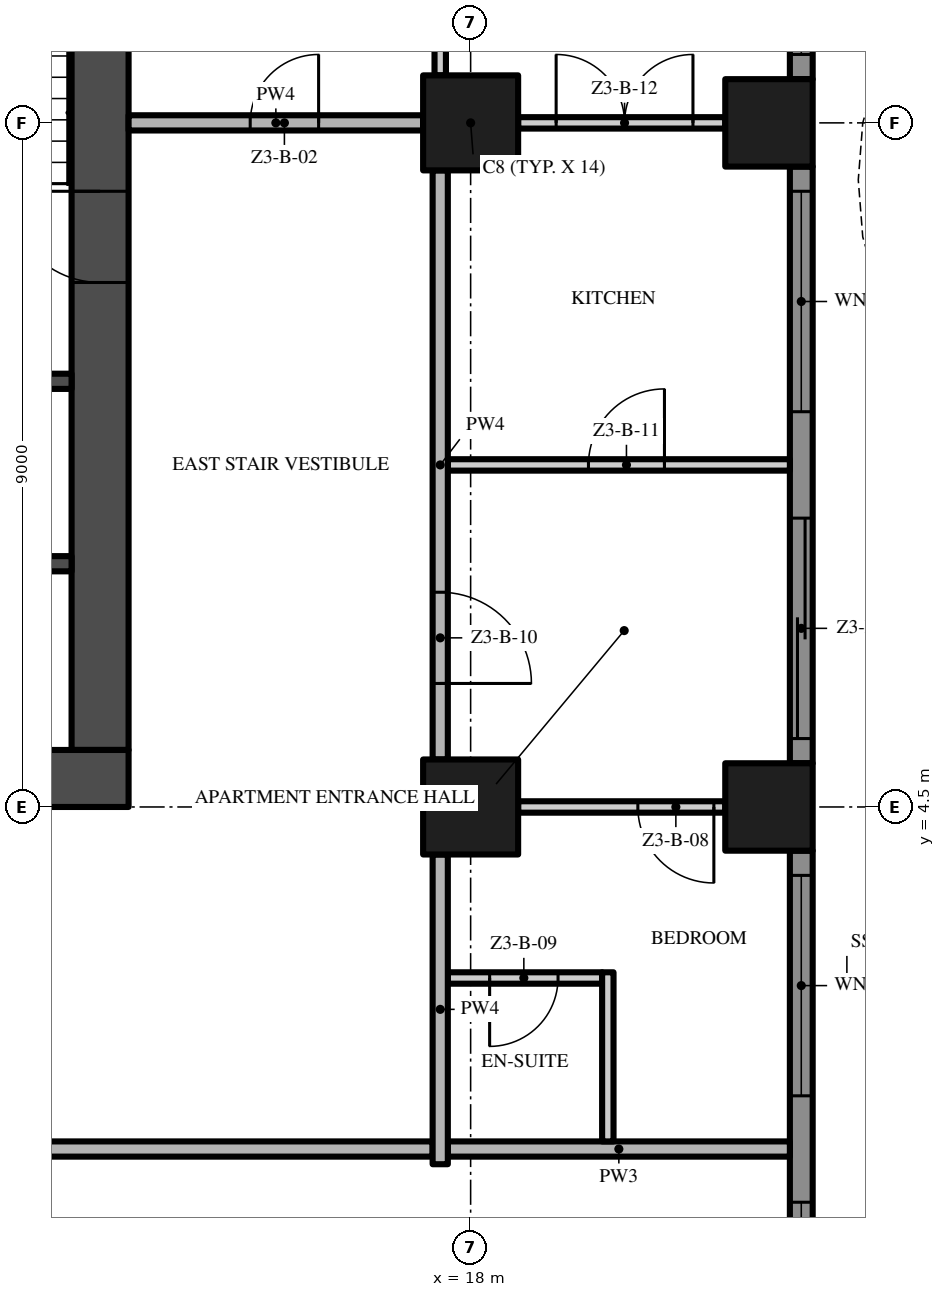
"""IFC4 building model, lengths in metres.
Left out: names, types, materials, properties, quantities, classifications, styles, units other than length and angle.
Written with IfcOpenShell. Run it as: python <this file> out.ifc"""

import sys

from ifc_helpers import new_model, si_unit, direction, frame, frame_2d, origin, origin_2d, place, context, subcontext, project, spatial, polyline, rectangle, outline, extrude, element, fill, save


model = new_model("IFC4")
c1 = context("Model", 3, precision=1e-05, world=origin(), true_north=direction((0.0, 1.0)))
c2 = subcontext(c1, "Body", "Model", "MODEL_VIEW")
j1 = project(units=[si_unit("LENGTHUNIT", "METRE"), si_unit("PLANEANGLEUNIT", "RADIAN")], contexts=[c1])
p1 = place(None, origin())
s1 = spatial("IfcSite", under=j1, at=p1, CompositionType="ELEMENT")
p2 = place(p1, origin())
s2 = spatial("IfcBuilding", under=s1, at=p2, CompositionType="ELEMENT")
p3 = place(p2, frame((0.0, 0.0, 144.0)))
s3 = spatial("IfcBuildingStorey", under=s2, at=p3, CompositionType="ELEMENT", Elevation=144.0)
p4 = place(p3, frame((-13.5, 4.875, -0.3), z_axis=(0.0, 0.0, 1.0), x_axis=(1.0, 0.0, 0.0)))
e1 = element("IfcWall", 1, at=p4, inside=s3, PredefinedType="SHEAR", context=c2, shape_type="SweptSolid", body=[
    extrude(rectangle(XDim=27.0, YDim=0.75, at=frame_2d((13.5, 0.0))), origin(), (0.0, 0.0, 1.0), 3.8),
])
p5 = place(p4, frame((12.0, 0.0, 0.3)))
e2 = element("IfcOpeningElement", 2, at=p5, cuts=e1, PredefinedType="OPENING", context=c2, shape_type="SweptSolid", body=[
    extrude(rectangle(XDim=3.0, YDim=2.4, at=frame_2d((1.5, 1.2))), frame((0.0, 0.385, 0.0), z_axis=(0.0, -1.0, 0.0), x_axis=(1.0, 0.0, 0.0)), (0.0, 0.0, 1.0), 0.77),
])
p6 = place(p4, frame((4.9, 0.0, 0.3)))
e3 = element("IfcOpeningElement", 3, at=p6, cuts=e1, PredefinedType="OPENING", context=c2, shape_type="SweptSolid", body=[
    extrude(rectangle(XDim=1.2, YDim=2.2, at=frame_2d((0.6, 1.1))), frame((0.0, 0.385, 0.0), z_axis=(0.0, -1.0, 0.0), x_axis=(1.0, 0.0, 0.0)), (0.0, 0.0, 1.0), 0.77),
])
p7 = place(p4, frame((20.75, 0.0, 0.3)))
e4 = element("IfcOpeningElement", 4, at=p7, cuts=e1, PredefinedType="OPENING", context=c2, shape_type="SweptSolid", body=[
    extrude(rectangle(XDim=1.5, YDim=2.2, at=frame_2d((0.75, 1.1))), frame((0.0, 0.385, 0.0), z_axis=(0.0, -1.0, 0.0), x_axis=(1.0, 0.0, 0.0)), (0.0, 0.0, 1.0), 0.77),
])
p8 = place(p4, frame((17.4, 0.0, 0.3)))
e5 = element("IfcOpeningElement", 5, at=p8, cuts=e1, PredefinedType="OPENING", context=c2, shape_type="SweptSolid", body=[
    extrude(rectangle(XDim=1.2, YDim=2.2, at=frame_2d((0.6, 1.1))), frame((0.0, 0.385, 0.0), z_axis=(0.0, -1.0, 0.0), x_axis=(1.0, 0.0, 0.0)), (0.0, 0.0, 1.0), 0.77),
])
p9 = place(p3, frame((13.125, 5.25, -0.3), z_axis=(0.0, 0.0, 1.0), x_axis=(0.0, 1.0, 0.0)))
e6 = element("IfcWall", 6, at=p9, inside=s3, PredefinedType="SHEAR", context=c2, shape_type="SweptSolid", body=[
    extrude(rectangle(XDim=16.5, YDim=0.75, at=frame_2d((8.25, 0.0))), origin(), (0.0, 0.0, 1.0), 3.8),
])
p10 = place(p9, frame((6.15, 0.0, 0.3)))
e7 = element("IfcOpeningElement", 7, at=p10, cuts=e6, PredefinedType="OPENING", context=c2, shape_type="SweptSolid", body=[
    extrude(rectangle(XDim=1.2, YDim=2.2, at=frame_2d((0.6, 1.1))), frame((0.0, 0.385, 0.0), z_axis=(0.0, -1.0, 0.0), x_axis=(1.0, 0.0, 0.0)), (0.0, 0.0, 1.0), 0.77),
])
for number, where, z_axis, x_axis in (
    (8, (18.0, 13.5, 0.0), (0.0, 0.0, 1.0), (1.0, 0.0, 0.0)),
    (9, (18.0, 4.5, 0.0), (0.0, 0.0, 1.0), (1.0, 0.0, 0.0)),
):
    element("IfcColumn", number, at=place(p3, frame(where, z_axis=z_axis, x_axis=x_axis)), inside=s3, PredefinedType="COLUMN", context=c2, shape_type="SweptSolid", body=[
        extrude(rectangle(XDim=1.25, YDim=1.25, at=origin_2d()), origin(), (0.0, 0.0, 1.0), 3.5),
    ])
for number, where, z_axis, x_axis in (
    (10, (21.925, 13.5, 0.0), (0.0, 0.0, 1.0), (1.0, 0.0, 0.0)),
    (11, (21.925, 4.5, 0.0), (0.0, 0.0, 1.0), (1.0, 0.0, 0.0)),
):
    element("IfcColumn", number, at=place(p3, frame(where, z_axis=z_axis, x_axis=x_axis)), inside=s3, PredefinedType="COLUMN", context=c2, shape_type="SweptSolid", body=[
        extrude(rectangle(XDim=1.15, YDim=1.15, at=origin_2d()), origin(), (0.0, 0.0, 1.0), 3.5),
    ])
p11 = place(p3, frame((22.35, 3.925, 0.0), z_axis=(0.0, 0.0, 1.0), x_axis=(0.0, -1.0, 0.0)))
e12 = element("IfcWall", 12, at=p11, inside=s3, PredefinedType="SOLIDWALL", context=c2, shape_type="SweptSolid", body=[
    extrude(rectangle(XDim=7.85, YDim=0.3, at=frame_2d((3.925, 0.0))), origin(), (0.0, 0.0, 1.0), 3.5),
])
p12 = place(p11, frame((4.625, 0.0, 0.45)))
e13 = element("IfcOpeningElement", 13, at=p12, cuts=e12, PredefinedType="OPENING", context=c2, shape_type="SweptSolid", body=[
    extrude(rectangle(XDim=2.9, YDim=2.65, at=frame_2d((1.45, 1.325))), frame((0.0, 0.16, 0.0), z_axis=(0.0, -1.0, 0.0), x_axis=(1.0, 0.0, 0.0)), (0.0, 0.0, 1.0), 0.32),
])
p13 = place(p11, frame((0.325, 0.0, 0.45)))
e14 = element("IfcOpeningElement", 14, at=p13, cuts=e12, PredefinedType="OPENING", context=c2, shape_type="SweptSolid", body=[
    extrude(rectangle(XDim=2.9, YDim=2.65, at=frame_2d((1.45, 1.325))), frame((0.0, 0.16, 0.0), z_axis=(0.0, -1.0, 0.0), x_axis=(1.0, 0.0, 0.0)), (0.0, 0.0, 1.0), 0.32),
])
p14 = place(p3, frame((22.35, 12.925, 0.0), z_axis=(0.0, 0.0, 1.0), x_axis=(0.0, -1.0, 0.0)))
e15 = element("IfcWall", 15, at=p14, inside=s3, PredefinedType="SOLIDWALL", context=c2, shape_type="SweptSolid", body=[
    extrude(rectangle(XDim=7.85, YDim=0.3, at=frame_2d((3.925, 0.0))), origin(), (0.0, 0.0, 1.0), 3.5),
])
p15 = place(p14, frame((4.625, 0.0, 0.0)))
e16 = element("IfcOpeningElement", 16, at=p15, cuts=e15, PredefinedType="OPENING", context=c2, shape_type="SweptSolid", body=[
    extrude(rectangle(XDim=2.9, YDim=2.4, at=frame_2d((1.45, 1.2))), frame((0.0, 0.16, 0.0), z_axis=(0.0, -1.0, 0.0), x_axis=(1.0, 0.0, 0.0)), (0.0, 0.0, 1.0), 0.32),
])
p16 = place(p14, frame((0.325, 0.0, 0.45)))
e17 = element("IfcOpeningElement", 17, at=p16, cuts=e15, PredefinedType="OPENING", context=c2, shape_type="SweptSolid", body=[
    extrude(rectangle(XDim=2.9, YDim=2.65, at=frame_2d((1.45, 1.325))), frame((0.0, 0.16, 0.0), z_axis=(0.0, -1.0, 0.0), x_axis=(1.0, 0.0, 0.0)), (0.0, 0.0, 1.0), 0.32),
])
p17 = place(p3, frame((22.35, 18.0, 0.0), z_axis=(0.0, 0.0, 1.0), x_axis=(0.0, -1.0, 0.0)))
e18 = element("IfcWall", 18, at=p17, inside=s3, PredefinedType="SOLIDWALL", context=c2, shape_type="SweptSolid", body=[
    extrude(rectangle(XDim=3.925, YDim=0.3, at=frame_2d((1.962, 0.0))), origin(), (0.0, 0.0, 1.0), 3.5),
])
p18 = place(p17, frame((0.7, 0.0, 0.45)))
e19 = element("IfcOpeningElement", 19, at=p18, cuts=e18, PredefinedType="OPENING", context=c2, shape_type="SweptSolid", body=[
    extrude(rectangle(XDim=2.9, YDim=2.65, at=frame_2d((1.45, 1.325))), frame((0.0, 0.16, 0.0), z_axis=(0.0, -1.0, 0.0), x_axis=(1.0, 0.0, 0.0)), (0.0, 0.0, 1.0), 0.32),
])
p19 = place(p3, origin())
e20 = element("IfcWall", 20, at=p19, inside=s3, PredefinedType="USERDEFINED", context=c2, shape_type="SweptSolid", body=[
    extrude(outline(polyline([(24.3, -13.5), (25.005, -12.0), (25.441, -10.5), (25.5, -9.75), (25.441, -9.0), (25.005, -7.5), (24.3, -6.0), (23.595, -4.5), (23.159, -3.0), (23.1, -2.25), (23.159, -1.5), (23.595, 0.0), (24.3, 1.5), (25.005, 3.0), (25.441, 4.5), (25.5, 5.25), (25.441, 6.0), (25.005, 7.5), (24.3, 9.0), (23.595, 10.5), (23.159, 12.0), (23.1, 12.75), (23.159, 13.5), (23.595, 15.0), (24.3, 16.5), (25.005, 18.0), (24.779, 18.106), (24.074, 16.606), (23.36, 15.089), (22.911, 13.545), (22.849, 12.75), (22.911, 11.955), (23.36, 10.411), (24.074, 8.894), (24.771, 7.411), (25.194, 5.955), (25.249, 5.25), (25.194, 4.545), (24.771, 3.089), (24.074, 1.606), (23.36, 0.089), (22.911, -1.455), (22.849, -2.25), (22.911, -3.045), (23.36, -4.589), (24.074, -6.106), (24.771, -7.589), (25.194, -9.045), (25.249, -9.75), (25.194, -10.455), (24.771, -11.911), (24.074, -13.394), (24.3, -13.5)])), origin(), (0.0, 0.0, 1.0), 0.9),
])
for number, where, z_axis, x_axis in (
    (21, (9.65, 7.7, 0.0), (0.0, 0.0, 1.0), (1.0, 0.0, 0.0)),
    (22, (9.65, 10.1, 0.0), (0.0, 0.0, 1.0), (1.0, 0.0, 0.0)),
):
    element("IfcWall", number, at=place(p3, frame(where, z_axis=z_axis, x_axis=x_axis)), inside=s3, PredefinedType="SHEAR", context=c2, shape_type="SweptSolid", body=[
        extrude(rectangle(XDim=3.1, YDim=0.2, at=frame_2d((1.55, 0.0))), origin(), (0.0, 0.0, 1.0), 3.5),
    ])
p20 = place(p3, frame((17.5, 0.0, 0.0), z_axis=(0.0, 0.0, 1.0), x_axis=(-1.0, 0.0, 0.0)))
e23 = element("IfcWall", 23, at=p20, inside=s3, PredefinedType="PARTITIONING", context=c2, shape_type="SweptSolid", body=[
    extrude(rectangle(XDim=35.0, YDim=0.2, at=frame_2d((17.5, 0.0))), origin(), (0.0, 0.0, 1.0), 3.5),
])
p21 = place(p20, frame((28.0, 0.0, 0.0)))
e24 = element("IfcOpeningElement", 24, at=p21, cuts=e23, PredefinedType="OPENING", context=c2, shape_type="SweptSolid", body=[
    extrude(rectangle(XDim=1.5, YDim=2.4, at=frame_2d((0.75, 1.2))), frame((0.0, 0.11, 0.0), z_axis=(0.0, -1.0, 0.0), x_axis=(1.0, 0.0, 0.0)), (0.0, 0.0, 1.0), 0.22),
])
p22 = place(p20, frame((10.0, 0.0, 0.0)))
e25 = element("IfcOpeningElement", 25, at=p22, cuts=e23, PredefinedType="OPENING", context=c2, shape_type="SweptSolid", body=[
    extrude(rectangle(XDim=1.5, YDim=2.4, at=frame_2d((0.75, 1.2))), frame((0.0, 0.11, 0.0), z_axis=(0.0, -1.0, 0.0), x_axis=(1.0, 0.0, 0.0)), (0.0, 0.0, 1.0), 0.22),
])
p23 = place(p3, frame((17.7, 0.0, 0.0), z_axis=(0.0, 0.0, 1.0), x_axis=(1.0, 0.0, 0.0)))
e26 = element("IfcWall", 26, at=p23, inside=s3, PredefinedType="PARTITIONING", context=c2, shape_type="SweptSolid", body=[
    extrude(rectangle(XDim=4.5, YDim=0.2, at=frame_2d((2.25, 0.0))), origin(), (0.0, 0.0, 1.0), 3.5),
])
p24 = place(p3, frame((19.73, 2.25, 0.0), z_axis=(0.0, 0.0, 1.0), x_axis=(-1.0, 0.0, 0.0)))
e27 = element("IfcWall", 27, at=p24, inside=s3, PredefinedType="PARTITIONING", context=c2, shape_type="SweptSolid", body=[
    extrude(rectangle(XDim=2.03, YDim=0.15, at=frame_2d((1.015, 0.0))), origin(), (0.0, 0.0, 1.0), 3.5),
])
p25 = place(p24, frame((0.58, 0.0, 0.0)))
e28 = element("IfcOpeningElement", 28, at=p25, cuts=e27, PredefinedType="OPENING", context=c2, shape_type="SweptSolid", body=[
    extrude(rectangle(XDim=0.9, YDim=2.1, at=frame_2d((0.45, 1.05))), frame((0.0, 0.085, 0.0), z_axis=(0.0, -1.0, 0.0), x_axis=(1.0, 0.0, 0.0)), (0.0, 0.0, 1.0), 0.17),
])
p26 = place(p3, frame((21.35, 4.5, 0.0), z_axis=(0.0, 0.0, 1.0), x_axis=(-1.0, 0.0, 0.0)))
e29 = element("IfcWall", 29, at=p26, inside=s3, PredefinedType="PARTITIONING", context=c2, shape_type="SweptSolid", body=[
    extrude(rectangle(XDim=2.725, YDim=0.15, at=frame_2d((1.363, 0.0))), origin(), (0.0, 0.0, 1.0), 3.5),
])
p27 = place(p26, frame((0.15, 0.0, 0.0)))
e30 = element("IfcOpeningElement", 30, at=p27, cuts=e29, PredefinedType="OPENING", context=c2, shape_type="SweptSolid", body=[
    extrude(rectangle(XDim=1.0, YDim=2.4, at=frame_2d((0.5, 1.2))), frame((0.0, 0.085, 0.0), z_axis=(0.0, -1.0, 0.0), x_axis=(1.0, 0.0, 0.0)), (0.0, 0.0, 1.0), 0.17),
])
p28 = place(p3, frame((17.7, 9.0, 0.0), z_axis=(0.0, 0.0, 1.0), x_axis=(1.0, 0.0, 0.0)))
e31 = element("IfcWall", 31, at=p28, inside=s3, PredefinedType="PARTITIONING", context=c2, shape_type="SweptSolid", body=[
    extrude(rectangle(XDim=4.5, YDim=0.15, at=frame_2d((2.25, 0.0))), origin(), (0.0, 0.0, 1.0), 3.5),
])
p29 = place(p28, frame((1.85, 0.0, 0.0)))
e32 = element("IfcOpeningElement", 32, at=p29, cuts=e31, PredefinedType="OPENING", context=c2, shape_type="SweptSolid", body=[
    extrude(rectangle(XDim=1.0, YDim=2.4, at=frame_2d((0.5, 1.2))), frame((0.0, 0.085, 0.0), z_axis=(0.0, -1.0, 0.0), x_axis=(1.0, 0.0, 0.0)), (0.0, 0.0, 1.0), 0.17),
])
p30 = place(p3, frame((13.5, 13.5, 0.0), z_axis=(0.0, 0.0, 1.0), x_axis=(1.0, 0.0, 0.0)))
e33 = element("IfcWall", 33, at=p30, inside=s3, PredefinedType="PARTITIONING", context=c2, shape_type="SweptSolid", body=[
    extrude(rectangle(XDim=3.875, YDim=0.2, at=frame_2d((1.938, 0.0))), origin(), (0.0, 0.0, 1.0), 3.5),
])
p31 = place(p30, frame((1.6, 0.0, 0.0)))
e34 = element("IfcOpeningElement", 34, at=p31, cuts=e33, PredefinedType="OPENING", context=c2, shape_type="SweptSolid", body=[
    extrude(rectangle(XDim=0.9, YDim=2.1, at=frame_2d((0.45, 1.05))), frame((0.0, 0.11, 0.0), z_axis=(0.0, -1.0, 0.0), x_axis=(1.0, 0.0, 0.0)), (0.0, 0.0, 1.0), 0.22),
])
p32 = place(p3, frame((18.625, 13.5, 0.0), z_axis=(0.0, 0.0, 1.0), x_axis=(1.0, 0.0, 0.0)))
e35 = element("IfcWall", 35, at=p32, inside=s3, PredefinedType="PARTITIONING", context=c2, shape_type="SweptSolid", body=[
    extrude(rectangle(XDim=2.725, YDim=0.15, at=frame_2d((1.363, 0.0))), origin(), (0.0, 0.0, 1.0), 3.5),
])
p33 = place(p32, frame((0.5, 0.0, 0.0)))
e36 = element("IfcOpeningElement", 36, at=p33, cuts=e35, PredefinedType="OPENING", context=c2, shape_type="SweptSolid", body=[
    extrude(rectangle(XDim=1.8, YDim=2.4, at=frame_2d((0.9, 1.2))), frame((0.0, 0.085, 0.0), z_axis=(0.0, -1.0, 0.0), x_axis=(1.0, 0.0, 0.0)), (0.0, 0.0, 1.0), 0.17),
])
p34 = place(p3, frame((17.6, -0.2, 0.0), z_axis=(0.0, 0.0, 1.0), x_axis=(0.0, 1.0, 0.0)))
e37 = element("IfcWall", 37, at=p34, inside=s3, PredefinedType="PARTITIONING", context=c2, shape_type="SweptSolid", body=[
    extrude(rectangle(XDim=4.075, YDim=0.2, at=frame_2d((2.038, 0.0))), origin(), (0.0, 0.0, 1.0), 3.5),
])
p35 = place(p3, frame((17.6, 12.875, 0.0), z_axis=(0.0, 0.0, 1.0), x_axis=(0.0, -1.0, 0.0)))
e38 = element("IfcWall", 38, at=p35, inside=s3, PredefinedType="PARTITIONING", context=c2, shape_type="SweptSolid", body=[
    extrude(rectangle(XDim=7.75, YDim=0.2, at=frame_2d((3.875, 0.0))), origin(), (0.0, 0.0, 1.0), 3.5),
])
p36 = place(p35, frame((5.55, 0.0, 0.0)))
e39 = element("IfcOpeningElement", 39, at=p36, cuts=e38, PredefinedType="OPENING", context=c2, shape_type="SweptSolid", body=[
    extrude(rectangle(XDim=1.2, YDim=2.4, at=frame_2d((0.6, 1.2))), frame((0.0, 0.11, 0.0), z_axis=(0.0, -1.0, 0.0), x_axis=(1.0, 0.0, 0.0)), (0.0, 0.0, 1.0), 0.22),
])
p37 = place(p3, frame((17.6, 14.125, 0.0), z_axis=(0.0, 0.0, 1.0), x_axis=(0.0, 1.0, 0.0)))
e40 = element("IfcWall", 40, at=p37, inside=s3, PredefinedType="PARTITIONING", context=c2, shape_type="SweptSolid", body=[
    extrude(rectangle(XDim=3.3, YDim=0.15, at=frame_2d((1.65, 0.0))), origin(), (0.0, 0.0, 1.0), 3.5),
])
p38 = place(p3, frame((19.805, 0.1, 0.0), z_axis=(0.0, 0.0, 1.0), x_axis=(0.0, 1.0, 0.0)))
e41 = element("IfcWall", 41, at=p38, inside=s3, PredefinedType="PARTITIONING", context=c2, shape_type="SweptSolid", body=[
    extrude(rectangle(XDim=2.225, YDim=0.15, at=frame_2d((1.113, 0.0))), origin(), (0.0, 0.0, 1.0), 3.5),
])
p39 = place(p12, origin())
e42 = element("IfcWindow", 42, at=p39, inside=s3, PartitioningType="SINGLE_PANEL", PredefinedType="WINDOW", context=c2, shape_type="SweptSolid", body=[
    extrude(rectangle(XDim=2.9, YDim=2.65, at=frame_2d((1.45, 1.325))), frame((0.0, 0.03, 0.0), z_axis=(0.0, -1.0, 0.0), x_axis=(1.0, 0.0, 0.0)), (0.0, 0.0, 1.0), 0.06),
])
fill(e13, e42)
p40 = place(p13, origin())
e43 = element("IfcWindow", 43, at=p40, inside=s3, PartitioningType="SINGLE_PANEL", PredefinedType="WINDOW", context=c2, shape_type="SweptSolid", body=[
    extrude(rectangle(XDim=2.9, YDim=2.65, at=frame_2d((1.45, 1.325))), frame((0.0, 0.03, 0.0), z_axis=(0.0, -1.0, 0.0), x_axis=(1.0, 0.0, 0.0)), (0.0, 0.0, 1.0), 0.06),
])
fill(e14, e43)
p41 = place(p15, origin())
e44 = element("IfcDoor", 44, at=p41, inside=s3, OperationType="SINGLE_SWING_LEFT", PredefinedType="DOOR", context=c2, shape_type="SweptSolid", body=[
    extrude(rectangle(XDim=2.9, YDim=2.4, at=frame_2d((1.45, 1.2))), frame((0.0, 0.025, 0.0), z_axis=(0.0, -1.0, 0.0), x_axis=(1.0, 0.0, 0.0)), (0.0, 0.0, 1.0), 0.05),
])
fill(e16, e44)
p42 = place(p16, origin())
e45 = element("IfcWindow", 45, at=p42, inside=s3, PartitioningType="SINGLE_PANEL", PredefinedType="WINDOW", context=c2, shape_type="SweptSolid", body=[
    extrude(rectangle(XDim=2.9, YDim=2.65, at=frame_2d((1.45, 1.325))), frame((0.0, 0.03, 0.0), z_axis=(0.0, -1.0, 0.0), x_axis=(1.0, 0.0, 0.0)), (0.0, 0.0, 1.0), 0.06),
])
fill(e17, e45)
p43 = place(p18, origin())
e46 = element("IfcWindow", 46, at=p43, inside=s3, PartitioningType="SINGLE_PANEL", PredefinedType="WINDOW", context=c2, shape_type="SweptSolid", body=[
    extrude(rectangle(XDim=2.9, YDim=2.65, at=frame_2d((1.45, 1.325))), frame((0.0, 0.03, 0.0), z_axis=(0.0, -1.0, 0.0), x_axis=(1.0, 0.0, 0.0)), (0.0, 0.0, 1.0), 0.06),
])
fill(e19, e46)
p44 = place(p10, frame((1.2, 0.0, 0.0), z_axis=(0.0, 0.0, 1.0), x_axis=(-1.0, 0.0, 0.0)))
e47 = element("IfcDoor", 47, at=p44, inside=s3, OperationType="SINGLE_SWING_LEFT", PredefinedType="DOOR", context=c2, shape_type="SweptSolid", body=[
    extrude(rectangle(XDim=1.2, YDim=2.2, at=frame_2d((0.6, 1.1))), frame((0.0, 0.025, 0.0), z_axis=(0.0, -1.0, 0.0), x_axis=(1.0, 0.0, 0.0)), (0.0, 0.0, 1.0), 0.05),
])
fill(e7, e47)
p45 = place(p31, origin())
e48 = element("IfcDoor", 48, at=p45, inside=s3, OperationType="SINGLE_SWING_RIGHT", PredefinedType="DOOR", context=c2, shape_type="SweptSolid", body=[
    extrude(rectangle(XDim=0.9, YDim=2.1, at=frame_2d((0.45, 1.05))), frame((0.0, 0.025, 0.0), z_axis=(0.0, -1.0, 0.0), x_axis=(1.0, 0.0, 0.0)), (0.0, 0.0, 1.0), 0.05),
])
fill(e34, e48)
p46 = place(p27, origin())
e49 = element("IfcDoor", 49, at=p46, inside=s3, OperationType="SINGLE_SWING_LEFT", PredefinedType="DOOR", context=c2, shape_type="SweptSolid", body=[
    extrude(rectangle(XDim=1.0, YDim=2.4, at=frame_2d((0.5, 1.2))), frame((0.0, 0.025, 0.0), z_axis=(0.0, -1.0, 0.0), x_axis=(1.0, 0.0, 0.0)), (0.0, 0.0, 1.0), 0.05),
])
fill(e30, e49)
p47 = place(p25, origin())
e50 = element("IfcDoor", 50, at=p47, inside=s3, OperationType="SINGLE_SWING_RIGHT", PredefinedType="DOOR", context=c2, shape_type="SweptSolid", body=[
    extrude(rectangle(XDim=0.9, YDim=2.1, at=frame_2d((0.45, 1.05))), frame((0.0, 0.025, 0.0), z_axis=(0.0, -1.0, 0.0), x_axis=(1.0, 0.0, 0.0)), (0.0, 0.0, 1.0), 0.05),
])
fill(e28, e50)
p48 = place(p36, origin())
e51 = element("IfcDoor", 51, at=p48, inside=s3, OperationType="SINGLE_SWING_RIGHT", PredefinedType="DOOR", context=c2, shape_type="SweptSolid", body=[
    extrude(rectangle(XDim=1.2, YDim=2.4, at=frame_2d((0.6, 1.2))), frame((0.0, 0.025, 0.0), z_axis=(0.0, -1.0, 0.0), x_axis=(1.0, 0.0, 0.0)), (0.0, 0.0, 1.0), 0.05),
])
fill(e39, e51)
p49 = place(p29, origin())
e52 = element("IfcDoor", 52, at=p49, inside=s3, OperationType="SINGLE_SWING_RIGHT", PredefinedType="DOOR", context=c2, shape_type="SweptSolid", body=[
    extrude(rectangle(XDim=1.0, YDim=2.4, at=frame_2d((0.5, 1.2))), frame((0.0, 0.025, 0.0), z_axis=(0.0, -1.0, 0.0), x_axis=(1.0, 0.0, 0.0)), (0.0, 0.0, 1.0), 0.05),
])
fill(e32, e52)
p50 = place(p33, origin())
e53 = element("IfcDoor", 53, at=p50, inside=s3, OperationType="DOUBLE_DOOR_SINGLE_SWING", PredefinedType="DOOR", context=c2, shape_type="SweptSolid", body=[
    extrude(rectangle(XDim=1.8, YDim=2.4, at=frame_2d((0.9, 1.2))), frame((0.0, 0.025, 0.0), z_axis=(0.0, -1.0, 0.0), x_axis=(1.0, 0.0, 0.0)), (0.0, 0.0, 1.0), 0.05),
])
fill(e36, e53)
save(model, sys.argv[1])
